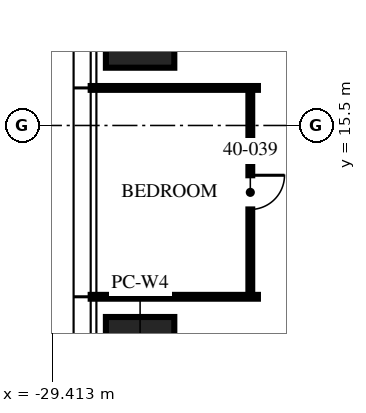
"""IFC4 building model, lengths in metres.
Left out: names, types, materials, properties, quantities, classifications, styles, units other than length and angle.
Written with IfcOpenShell. Run it as: python <this file> out.ifc"""

import sys

from ifc_helpers import new_model, si_unit, direction, frame, frame_2d, origin, origin_2d, place, context, subcontext, project, spatial, rectangle, extrude, element, fill, save


model = new_model("IFC4")
c1 = context("Model", 3, precision=1e-05, world=origin(), true_north=direction((0.0, 1.0)))
c2 = subcontext(c1, "Body", "Model", "MODEL_VIEW")
j1 = project(units=[si_unit("LENGTHUNIT", "METRE"), si_unit("PLANEANGLEUNIT", "RADIAN")], contexts=[c1])
p1 = place(None, origin())
s1 = spatial("IfcSite", under=j1, at=p1, CompositionType="ELEMENT")
p2 = place(p1, origin())
s2 = spatial("IfcBuilding", under=s1, at=p2, CompositionType="ELEMENT")
p3 = place(p2, frame((0.0, 0.0, 159.75)))
s3 = spatial("IfcBuildingStorey", under=s2, at=p3, CompositionType="ELEMENT", Elevation=159.75)
for number, where, z_axis, x_axis in (
    (1, (-27.1, 9.16, 0.0), (0.0, 0.0, 1.0), (0.0, 1.0, 0.0)),
    (2, (-27.1, 18.32, 0.0), (0.0, 0.0, 1.0), (0.0, 1.0, 0.0)),
):
    element("IfcColumn", number, at=place(p3, frame(where, z_axis=z_axis, x_axis=x_axis)), inside=s3, PredefinedType="COLUMN", context=c2, shape_type="SweptSolid", body=[
        extrude(rectangle(XDim=2.6, YDim=1.8, at=origin_2d()), origin(), (0.0, 0.0, 1.0), 3.75),
    ])
for number, where, z_axis, x_axis in (
    (3, (-24.0, 16.488, 0.0), (0.0, 0.0, 1.0), (-1.0, 0.0, 0.0)),
    (4, (-24.0, 10.992, 0.0), (0.0, 0.0, 1.0), (-1.0, 0.0, 0.0)),
):
    element("IfcWall", number, at=place(p3, frame(where, z_axis=z_axis, x_axis=x_axis)), inside=s3, PredefinedType="PARTITIONING", context=c2, shape_type="SweptSolid", body=[
        extrude(rectangle(XDim=4.4, YDim=0.1, at=frame_2d((2.2, 0.0))), origin(), (0.0, 0.0, 1.0), 2.81),
    ])
p4 = place(p3, frame((-24.2, 16.488, 0.0), z_axis=(0.0, 0.0, 1.0), x_axis=(0.0, -1.0, 0.0)))
e5 = element("IfcWall", 5, at=p4, inside=s3, PredefinedType="PARTITIONING", context=c2, shape_type="SweptSolid", body=[
    extrude(rectangle(XDim=5.496, YDim=0.1, at=frame_2d((2.748, 0.0))), origin(), (0.0, 0.0, 1.0), 2.81),
])
p5 = place(p4, frame((2.298, 0.0, 0.0)))
e6 = element("IfcOpeningElement", 6, at=p5, cuts=e5, PredefinedType="OPENING", context=c2, shape_type="SweptSolid", body=[
    extrude(rectangle(XDim=0.9, YDim=2.1, at=frame_2d((0.45, 1.05))), frame((0.0, 0.06, 0.0), z_axis=(0.0, -1.0, 0.0), x_axis=(1.0, 0.0, 0.0)), (0.0, 0.0, 1.0), 0.12),
])
p6 = place(p5, origin())
e7 = element("IfcDoor", 7, at=p6, inside=s3, OperationType="SINGLE_SWING_LEFT", PredefinedType="DOOR", context=c2, shape_type="SweptSolid", body=[
    extrude(rectangle(XDim=0.9, YDim=2.1, at=frame_2d((0.45, 1.05))), frame((0.0, 0.025, 0.0), z_axis=(0.0, -1.0, 0.0), x_axis=(1.0, 0.0, 0.0)), (0.0, 0.0, 1.0), 0.05),
])
fill(e6, e7)
save(model, sys.argv[1])
